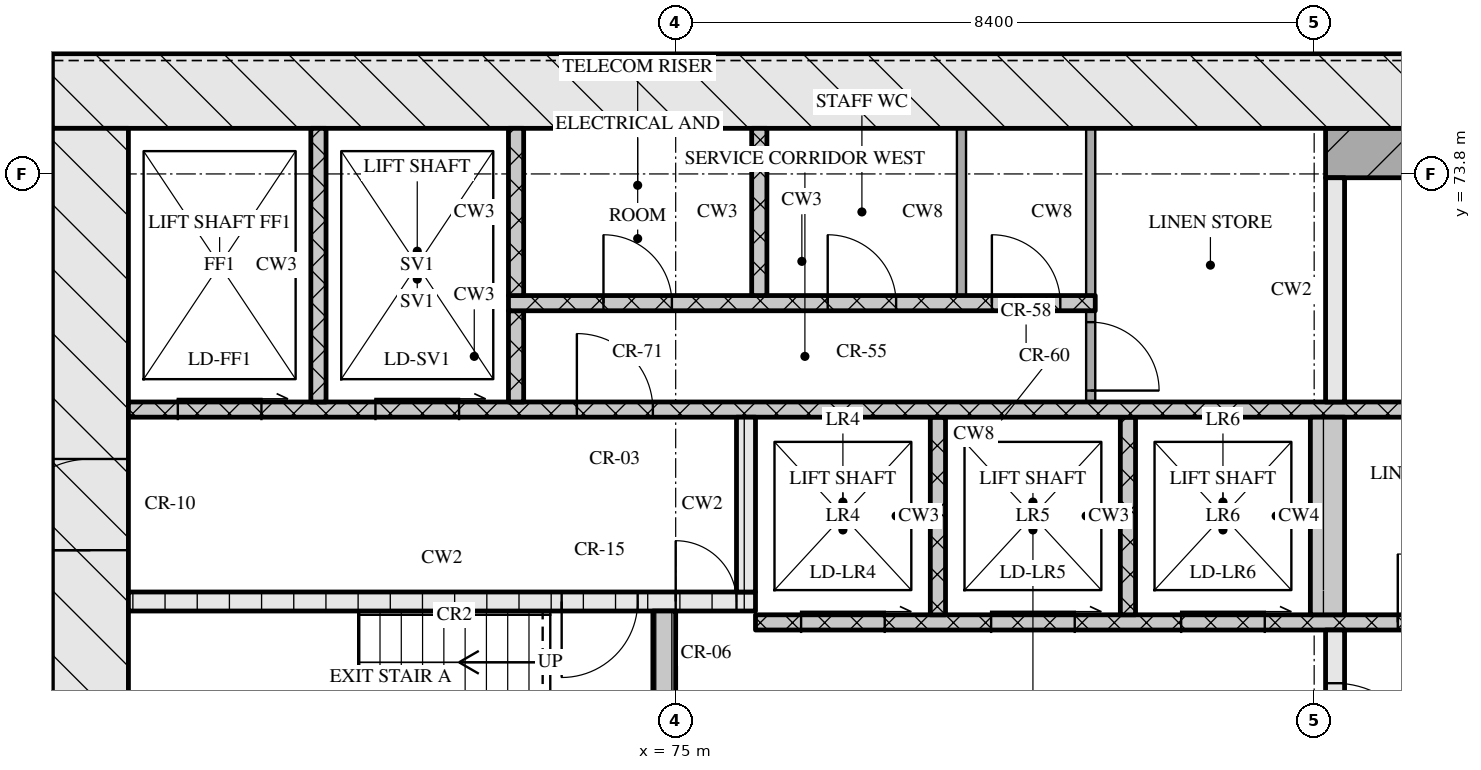
"""IFC4 building model, lengths in metres.
Left out: names, types, materials, properties, quantities, classifications, styles, units other than length and angle.
Written with IfcOpenShell. Run it as: python <this file> out.ifc"""

import sys

from ifc_helpers import new_model, si_unit, direction, frame, frame_2d, origin, place, context, subcontext, project, spatial, rectangle, extrude, element, fill, save


model = new_model("IFC4")
c1 = context("Model", 3, precision=1e-05, world=origin(), true_north=direction((0.0, 1.0)))
c2 = subcontext(c1, "Body", "Model", "MODEL_VIEW")
j1 = project(units=[si_unit("LENGTHUNIT", "METRE"), si_unit("PLANEANGLEUNIT", "RADIAN")], contexts=[c1])
p1 = place(None, origin())
s1 = spatial("IfcSite", under=j1, at=p1, CompositionType="ELEMENT")
p2 = place(p1, origin())
s2 = spatial("IfcBuilding", under=s1, at=p2, CompositionType="ELEMENT")
p3 = place(p2, frame((0.0, 0.0, 120.45)))
s3 = spatial("IfcBuildingStorey", under=s2, at=p3, CompositionType="ELEMENT", Elevation=120.45)
p4 = place(p3, frame((66.8, 74.9, 0.0), z_axis=(0.0, 0.0, 1.0), x_axis=(1.0, 0.0, 0.0)))
e1 = element("IfcWall", 1, at=p4, inside=s3, PredefinedType="SOLIDWALL", context=c2, shape_type="SweptSolid", body=[
    extrude(rectangle(XDim=41.6, YDim=1.0, at=frame_2d((20.8, 0.0))), origin(), (0.0, 0.0, 1.0), 3.32),
])
p5 = place(p3, frame((67.3, 62.4, 0.0), z_axis=(0.0, 0.0, 1.0), x_axis=(0.0, 1.0, 0.0)))
e2 = element("IfcWall", 2, at=p5, inside=s3, PredefinedType="SOLIDWALL", context=c2, shape_type="SweptSolid", body=[
    extrude(rectangle(XDim=12.0, YDim=1.0, at=frame_2d((6.0, 0.0))), origin(), (0.0, 0.0, 1.0), 3.32),
])
p6 = place(p5, frame((6.45, 0.0, 0.0)))
e3 = element("IfcOpeningElement", 3, at=p6, cuts=e2, PredefinedType="OPENING", context=c2, shape_type="SweptSolid", body=[
    extrude(rectangle(XDim=1.2, YDim=2.1, at=frame_2d((0.6, 1.05))), frame((0.0, 0.51, 0.0), z_axis=(0.0, -1.0, 0.0), x_axis=(1.0, 0.0, 0.0)), (0.0, 0.0, 1.0), 1.02),
])
p7 = place(p3, frame((74.85, 65.2, 0.0), z_axis=(0.0, 0.0, 1.0), x_axis=(0.0, 1.0, 0.0)))
e4 = element("IfcWall", 4, at=p7, inside=s3, PredefinedType="SOLIDWALL", context=c2, shape_type="SweptSolid", body=[
    extrude(rectangle(XDim=2.85, YDim=0.3, at=frame_2d((1.425, 0.0))), origin(), (0.0, 0.0, 1.0), 3.32),
])
p8 = place(p3, frame((83.675, 65.2, 0.0), z_axis=(0.0, 0.0, 1.0), x_axis=(0.0, 1.0, 0.0)))
e5 = element("IfcWall", 5, at=p8, inside=s3, PredefinedType="SOLIDWALL", context=c2, shape_type="SweptSolid", body=[
    extrude(rectangle(XDim=2.6, YDim=0.25, at=frame_2d((1.3, 0.0))), origin(), (0.0, 0.0, 1.0), 3.32),
])
p9 = place(p8, frame((0.7, 0.0, 0.0)))
e6 = element("IfcOpeningElement", 6, at=p9, cuts=e5, PredefinedType="OPENING", context=c2, shape_type="SweptSolid", body=[
    extrude(rectangle(XDim=1.2, YDim=2.1, at=frame_2d((0.6, 1.05))), frame((0.0, 0.135, 0.0), z_axis=(0.0, -1.0, 0.0), x_axis=(1.0, 0.0, 0.0)), (0.0, 0.0, 1.0), 0.27),
])
p10 = place(p3, frame((76.05, 67.9, 0.0), z_axis=(0.0, 0.0, 1.0), x_axis=(1.0, 0.0, 0.0)))
e7 = element("IfcWall", 7, at=p10, inside=s3, PredefinedType="SOLIDWALL", context=c2, shape_type="SweptSolid", body=[
    extrude(rectangle(XDim=23.1, YDim=0.2, at=frame_2d((11.55, 0.0))), origin(), (0.0, 0.0, 1.0), 3.32),
])
p11 = place(p10, frame((0.6, 0.0, 0.0)))
e8 = element("IfcOpeningElement", 8, at=p11, cuts=e7, PredefinedType="OPENING", context=c2, shape_type="SweptSolid", body=[
    extrude(rectangle(XDim=1.1, YDim=2.1, at=frame_2d((0.55, 1.05))), frame((0.0, 0.11, 0.0), z_axis=(0.0, -1.0, 0.0), x_axis=(1.0, 0.0, 0.0)), (0.0, 0.0, 1.0), 0.22),
])
p12 = place(p10, frame((3.1, 0.0, 0.0)))
e9 = element("IfcOpeningElement", 9, at=p12, cuts=e7, PredefinedType="OPENING", context=c2, shape_type="SweptSolid", body=[
    extrude(rectangle(XDim=1.1, YDim=2.1, at=frame_2d((0.55, 1.05))), frame((0.0, 0.11, 0.0), z_axis=(0.0, -1.0, 0.0), x_axis=(1.0, 0.0, 0.0)), (0.0, 0.0, 1.0), 0.22),
])
p13 = place(p10, frame((5.6, 0.0, 0.0)))
e10 = element("IfcOpeningElement", 10, at=p13, cuts=e7, PredefinedType="OPENING", context=c2, shape_type="SweptSolid", body=[
    extrude(rectangle(XDim=1.1, YDim=2.1, at=frame_2d((0.55, 1.05))), frame((0.0, 0.11, 0.0), z_axis=(0.0, -1.0, 0.0), x_axis=(1.0, 0.0, 0.0)), (0.0, 0.0, 1.0), 0.22),
])
p14 = place(p10, frame((8.45, 0.0, 0.0)))
e11 = element("IfcOpeningElement", 11, at=p14, cuts=e7, PredefinedType="OPENING", context=c2, shape_type="SweptSolid", body=[
    extrude(rectangle(XDim=0.9, YDim=2.1, at=frame_2d((0.45, 1.05))), frame((0.0, 0.11, 0.0), z_axis=(0.0, -1.0, 0.0), x_axis=(1.0, 0.0, 0.0)), (0.0, 0.0, 1.0), 0.22),
])
p15 = place(p10, frame((10.91, 0.0, 0.0)))
e12 = element("IfcOpeningElement", 12, at=p15, cuts=e7, PredefinedType="OPENING", context=c2, shape_type="SweptSolid", body=[
    extrude(rectangle(XDim=0.9, YDim=2.1, at=frame_2d((0.45, 1.05))), frame((0.0, 0.11, 0.0), z_axis=(0.0, -1.0, 0.0), x_axis=(1.0, 0.0, 0.0)), (0.0, 0.0, 1.0), 0.22),
])
p16 = place(p10, frame((13.55, 0.0, 0.0)))
e13 = element("IfcOpeningElement", 13, at=p16, cuts=e7, PredefinedType="OPENING", context=c2, shape_type="SweptSolid", body=[
    extrude(rectangle(XDim=1.0, YDim=2.1, at=frame_2d((0.5, 1.05))), frame((0.0, 0.11, 0.0), z_axis=(0.0, -1.0, 0.0), x_axis=(1.0, 0.0, 0.0)), (0.0, 0.0, 1.0), 0.22),
])
for number, where, z_axis, x_axis in (
    (14, (78.45, 68.0, 0.0), (0.0, 0.0, 1.0), (0.0, 1.0, 0.0)),
    (15, (80.95, 68.0, 0.0), (0.0, 0.0, 1.0), (0.0, 1.0, 0.0)),
):
    element("IfcWall", number, at=place(p3, frame(where, z_axis=z_axis, x_axis=x_axis)), inside=s3, PredefinedType="SOLIDWALL", context=c2, shape_type="SweptSolid", body=[
        extrude(rectangle(XDim=2.6, YDim=0.2, at=frame_2d((1.3, 0.0))), origin(), (0.0, 0.0, 1.0), 3.32),
    ])
p17 = place(p3, frame((83.575, 68.0, 0.0), z_axis=(0.0, 0.0, 1.0), x_axis=(0.0, 1.0, 0.0)))
e16 = element("IfcWall", 16, at=p17, inside=s3, PredefinedType="SOLIDWALL", context=c2, shape_type="SweptSolid", body=[
    extrude(rectangle(XDim=2.6, YDim=0.45, at=frame_2d((1.3, 0.0))), origin(), (0.0, 0.0, 1.0), 3.32),
])
p18 = place(p3, frame((67.8, 68.175, 0.0), z_axis=(0.0, 0.0, 1.0), x_axis=(1.0, 0.0, 0.0)))
e17 = element("IfcWall", 17, at=p18, inside=s3, PredefinedType="SOLIDWALL", context=c2, shape_type="SweptSolid", body=[
    extrude(rectangle(XDim=8.25, YDim=0.25, at=frame_2d((4.125, 0.0))), origin(), (0.0, 0.0, 1.0), 3.32),
])
p19 = place(p18, frame((5.7, 0.0, 0.0)))
e18 = element("IfcOpeningElement", 18, at=p19, cuts=e17, PredefinedType="OPENING", context=c2, shape_type="SweptSolid", body=[
    extrude(rectangle(XDim=1.0, YDim=2.1, at=frame_2d((0.5, 1.05))), frame((0.0, 0.135, 0.0), z_axis=(0.0, -1.0, 0.0), x_axis=(1.0, 0.0, 0.0)), (0.0, 0.0, 1.0), 0.27),
])
p20 = place(p18, frame((7.2, 0.0, 0.0)))
e19 = element("IfcOpeningElement", 19, at=p20, cuts=e17, PredefinedType="OPENING", context=c2, shape_type="SweptSolid", body=[
    extrude(rectangle(XDim=0.8, YDim=2.1, at=frame_2d((0.4, 1.05))), frame((0.0, 0.135, 0.0), z_axis=(0.0, -1.0, 0.0), x_axis=(1.0, 0.0, 0.0)), (0.0, 0.0, 1.0), 0.27),
])
p21 = place(p3, frame((75.925, 68.3, 0.0), z_axis=(0.0, 0.0, 1.0), x_axis=(0.0, 1.0, 0.0)))
e20 = element("IfcWall", 20, at=p21, inside=s3, PredefinedType="SOLIDWALL", context=c2, shape_type="SweptSolid", body=[
    extrude(rectangle(XDim=2.3, YDim=0.25, at=frame_2d((1.15, 0.0))), origin(), (0.0, 0.0, 1.0), 3.32),
])
p22 = place(p3, frame((67.8, 70.7, 0.0), z_axis=(0.0, 0.0, 1.0), x_axis=(1.0, 0.0, 0.0)))
e21 = element("IfcWall", 21, at=p22, inside=s3, PredefinedType="SOLIDWALL", context=c2, shape_type="SweptSolid", body=[
    extrude(rectangle(XDim=39.6, YDim=0.2, at=frame_2d((19.8, 0.0))), origin(), (0.0, 0.0, 1.0), 3.32),
])
p23 = place(p22, frame((0.65, 0.0, 0.0)))
e22 = element("IfcOpeningElement", 22, at=p23, cuts=e21, PredefinedType="OPENING", context=c2, shape_type="SweptSolid", body=[
    extrude(rectangle(XDim=1.1, YDim=2.1, at=frame_2d((0.55, 1.05))), frame((0.0, 0.11, 0.0), z_axis=(0.0, -1.0, 0.0), x_axis=(1.0, 0.0, 0.0)), (0.0, 0.0, 1.0), 0.22),
])
p24 = place(p22, frame((3.25, 0.0, 0.0)))
e23 = element("IfcOpeningElement", 23, at=p24, cuts=e21, PredefinedType="OPENING", context=c2, shape_type="SweptSolid", body=[
    extrude(rectangle(XDim=1.1, YDim=2.1, at=frame_2d((0.55, 1.05))), frame((0.0, 0.11, 0.0), z_axis=(0.0, -1.0, 0.0), x_axis=(1.0, 0.0, 0.0)), (0.0, 0.0, 1.0), 0.22),
])
p25 = place(p22, frame((5.9, 0.0, 0.0)))
e24 = element("IfcOpeningElement", 24, at=p25, cuts=e21, PredefinedType="OPENING", context=c2, shape_type="SweptSolid", body=[
    extrude(rectangle(XDim=1.0, YDim=2.1, at=frame_2d((0.5, 1.05))), frame((0.0, 0.11, 0.0), z_axis=(0.0, -1.0, 0.0), x_axis=(1.0, 0.0, 0.0)), (0.0, 0.0, 1.0), 0.22),
])
p26 = place(p22, frame((21.7, 0.0, 0.0)))
e25 = element("IfcOpeningElement", 25, at=p26, cuts=e21, PredefinedType="OPENING", context=c2, shape_type="SweptSolid", body=[
    extrude(rectangle(XDim=1.0, YDim=2.1, at=frame_2d((0.5, 1.05))), frame((0.0, 0.11, 0.0), z_axis=(0.0, -1.0, 0.0), x_axis=(1.0, 0.0, 0.0)), (0.0, 0.0, 1.0), 0.22),
])
p27 = place(p22, frame((32.7, 0.0, 0.0)))
e26 = element("IfcOpeningElement", 26, at=p27, cuts=e21, PredefinedType="OPENING", context=c2, shape_type="SweptSolid", body=[
    extrude(rectangle(XDim=1.0, YDim=2.1, at=frame_2d((0.5, 1.05))), frame((0.0, 0.11, 0.0), z_axis=(0.0, -1.0, 0.0), x_axis=(1.0, 0.0, 0.0)), (0.0, 0.0, 1.0), 0.22),
])
p28 = place(p22, frame((35.25, 0.0, 0.0)))
e27 = element("IfcOpeningElement", 27, at=p28, cuts=e21, PredefinedType="OPENING", context=c2, shape_type="SweptSolid", body=[
    extrude(rectangle(XDim=1.1, YDim=2.1, at=frame_2d((0.55, 1.05))), frame((0.0, 0.11, 0.0), z_axis=(0.0, -1.0, 0.0), x_axis=(1.0, 0.0, 0.0)), (0.0, 0.0, 1.0), 0.22),
])
p29 = place(p22, frame((37.85, 0.0, 0.0)))
e28 = element("IfcOpeningElement", 28, at=p29, cuts=e21, PredefinedType="OPENING", context=c2, shape_type="SweptSolid", body=[
    extrude(rectangle(XDim=1.1, YDim=2.1, at=frame_2d((0.55, 1.05))), frame((0.0, 0.11, 0.0), z_axis=(0.0, -1.0, 0.0), x_axis=(1.0, 0.0, 0.0)), (0.0, 0.0, 1.0), 0.22),
])
p30 = place(p3, frame((70.3, 70.8, 0.0), z_axis=(0.0, 0.0, 1.0), x_axis=(0.0, 1.0, 0.0)))
e29 = element("IfcWall", 29, at=p30, inside=s3, PredefinedType="SOLIDWALL", context=c2, shape_type="SweptSolid", body=[
    extrude(rectangle(XDim=3.6, YDim=0.2, at=frame_2d((1.8, 0.0))), origin(), (0.0, 0.0, 1.0), 3.32),
])
p31 = place(p3, frame((72.9, 70.8, 0.0), z_axis=(0.0, 0.0, 1.0), x_axis=(0.0, 1.0, 0.0)))
e30 = element("IfcWall", 30, at=p31, inside=s3, PredefinedType="SOLIDWALL", context=c2, shape_type="SweptSolid", body=[
    extrude(rectangle(XDim=1.2, YDim=0.2, at=frame_2d((0.6, 0.0))), origin(), (0.0, 0.0, 1.0), 3.32),
])
p32 = place(p3, frame((80.46, 70.8, 0.0), z_axis=(0.0, 0.0, 1.0), x_axis=(0.0, 1.0, 0.0)))
e31 = element("IfcWall", 31, at=p32, inside=s3, PredefinedType="PARTITIONING", context=c2, shape_type="SweptSolid", body=[
    extrude(rectangle(XDim=1.2, YDim=0.12, at=frame_2d((0.6, 0.0))), origin(), (0.0, 0.0, 1.0), 3.32),
])
p33 = place(p32, frame((0.15, 0.0, 0.0)))
e32 = element("IfcOpeningElement", 32, at=p33, cuts=e31, PredefinedType="OPENING", context=c2, shape_type="SweptSolid", body=[
    extrude(rectangle(XDim=0.9, YDim=2.1, at=frame_2d((0.45, 1.05))), frame((0.0, 0.07, 0.0), z_axis=(0.0, -1.0, 0.0), x_axis=(1.0, 0.0, 0.0)), (0.0, 0.0, 1.0), 0.14),
])
p34 = place(p3, frame((83.675, 70.8, 0.0), z_axis=(0.0, 0.0, 1.0), x_axis=(0.0, 1.0, 0.0)))
e33 = element("IfcWall", 33, at=p34, inside=s3, PredefinedType="SOLIDWALL", context=c2, shape_type="SweptSolid", body=[
    extrude(rectangle(XDim=2.95, YDim=0.25, at=frame_2d((1.475, 0.0))), origin(), (0.0, 0.0, 1.0), 3.32),
])
p35 = place(p3, frame((72.8, 72.1, 0.0), z_axis=(0.0, 0.0, 1.0), x_axis=(1.0, 0.0, 0.0)))
e34 = element("IfcWall", 34, at=p35, inside=s3, PredefinedType="SOLIDWALL", context=c2, shape_type="SweptSolid", body=[
    extrude(rectangle(XDim=7.72, YDim=0.2, at=frame_2d((3.86, 0.0))), origin(), (0.0, 0.0, 1.0), 3.32),
])
p36 = place(p35, frame((1.25, 0.0, 0.0)))
e35 = element("IfcOpeningElement", 35, at=p36, cuts=e34, PredefinedType="OPENING", context=c2, shape_type="SweptSolid", body=[
    extrude(rectangle(XDim=0.9, YDim=2.1, at=frame_2d((0.45, 1.05))), frame((0.0, 0.11, 0.0), z_axis=(0.0, -1.0, 0.0), x_axis=(1.0, 0.0, 0.0)), (0.0, 0.0, 1.0), 0.22),
])
p37 = place(p35, frame((4.2, 0.0, 0.0)))
e36 = element("IfcOpeningElement", 36, at=p37, cuts=e34, PredefinedType="OPENING", context=c2, shape_type="SweptSolid", body=[
    extrude(rectangle(XDim=0.9, YDim=2.1, at=frame_2d((0.45, 1.05))), frame((0.0, 0.11, 0.0), z_axis=(0.0, -1.0, 0.0), x_axis=(1.0, 0.0, 0.0)), (0.0, 0.0, 1.0), 0.22),
])
p38 = place(p35, frame((6.36, 0.0, 0.0)))
e37 = element("IfcOpeningElement", 37, at=p38, cuts=e34, PredefinedType="OPENING", context=c2, shape_type="SweptSolid", body=[
    extrude(rectangle(XDim=0.9, YDim=2.1, at=frame_2d((0.45, 1.05))), frame((0.0, 0.11, 0.0), z_axis=(0.0, -1.0, 0.0), x_axis=(1.0, 0.0, 0.0)), (0.0, 0.0, 1.0), 0.22),
])
for number, where, z_axis, x_axis in (
    (38, (72.9, 72.2, 0.0), (0.0, 0.0, 1.0), (0.0, 1.0, 0.0)),
    (39, (76.1, 72.2, 0.0), (0.0, 0.0, 1.0), (0.0, 1.0, 0.0)),
):
    element("IfcWall", number, at=place(p3, frame(where, z_axis=z_axis, x_axis=x_axis)), inside=s3, PredefinedType="SOLIDWALL", context=c2, shape_type="SweptSolid", body=[
        extrude(rectangle(XDim=2.2, YDim=0.2, at=frame_2d((1.1, 0.0))), origin(), (0.0, 0.0, 1.0), 3.32),
    ])
for number, where, z_axis, x_axis in (
    (40, (78.76, 72.2, 0.0), (0.0, 0.0, 1.0), (0.0, 1.0, 0.0)),
    (41, (80.46, 72.2, 0.0), (0.0, 0.0, 1.0), (0.0, 1.0, 0.0)),
):
    element("IfcWall", number, at=place(p3, frame(where, z_axis=z_axis, x_axis=x_axis)), inside=s3, PredefinedType="PARTITIONING", context=c2, shape_type="SweptSolid", body=[
        extrude(rectangle(XDim=2.2, YDim=0.12, at=frame_2d((1.1, 0.0))), origin(), (0.0, 0.0, 1.0), 3.32),
    ])
p39 = place(p3, frame((83.55, 74.075, 0.0), z_axis=(0.0, 0.0, 1.0), x_axis=(1.0, 0.0, 0.0)))
e42 = element("IfcWall", 42, at=p39, inside=s3, PredefinedType="SOLIDWALL", context=c2, shape_type="SweptSolid", body=[
    extrude(rectangle(XDim=8.1, YDim=0.65, at=frame_2d((4.05, 0.0))), origin(), (0.0, 0.0, 1.0), 3.32),
])
p40 = place(p9, origin())
e43 = element("IfcDoor", 43, at=p40, inside=s3, OperationType="SINGLE_SWING_RIGHT", PredefinedType="DOOR", context=c2, shape_type="SweptSolid", body=[
    extrude(rectangle(XDim=1.2, YDim=2.1, at=frame_2d((0.6, 1.05))), frame((0.0, 0.025, 0.0), z_axis=(0.0, -1.0, 0.0), x_axis=(1.0, 0.0, 0.0)), (0.0, 0.0, 1.0), 0.05),
])
fill(e6, e43)
p41 = place(p11, origin())
e44 = element("IfcDoor", 44, at=p41, inside=s3, OperationType="SLIDING_TO_RIGHT", PredefinedType="DOOR", context=c2, shape_type="SweptSolid", body=[
    extrude(rectangle(XDim=1.1, YDim=2.1, at=frame_2d((0.55, 1.05))), frame((0.0, 0.025, 0.0), z_axis=(0.0, -1.0, 0.0), x_axis=(1.0, 0.0, 0.0)), (0.0, 0.0, 1.0), 0.05),
])
fill(e8, e44)
p42 = place(p12, origin())
e45 = element("IfcDoor", 45, at=p42, inside=s3, OperationType="SLIDING_TO_RIGHT", PredefinedType="DOOR", context=c2, shape_type="SweptSolid", body=[
    extrude(rectangle(XDim=1.1, YDim=2.1, at=frame_2d((0.55, 1.05))), frame((0.0, 0.025, 0.0), z_axis=(0.0, -1.0, 0.0), x_axis=(1.0, 0.0, 0.0)), (0.0, 0.0, 1.0), 0.05),
])
fill(e9, e45)
p43 = place(p13, origin())
e46 = element("IfcDoor", 46, at=p43, inside=s3, OperationType="SLIDING_TO_RIGHT", PredefinedType="DOOR", context=c2, shape_type="SweptSolid", body=[
    extrude(rectangle(XDim=1.1, YDim=2.1, at=frame_2d((0.55, 1.05))), frame((0.0, 0.025, 0.0), z_axis=(0.0, -1.0, 0.0), x_axis=(1.0, 0.0, 0.0)), (0.0, 0.0, 1.0), 0.05),
])
fill(e10, e46)
p44 = place(p14, origin())
e47 = element("IfcDoor", 47, at=p44, inside=s3, OperationType="SINGLE_SWING_LEFT", PredefinedType="DOOR", context=c2, shape_type="SweptSolid", body=[
    extrude(rectangle(XDim=0.9, YDim=2.1, at=frame_2d((0.45, 1.05))), frame((0.0, 0.025, 0.0), z_axis=(0.0, -1.0, 0.0), x_axis=(1.0, 0.0, 0.0)), (0.0, 0.0, 1.0), 0.05),
])
fill(e11, e47)
p45 = place(p19, origin())
e48 = element("IfcDoor", 48, at=p45, inside=s3, OperationType="SINGLE_SWING_RIGHT", PredefinedType="DOOR", context=c2, shape_type="SweptSolid", body=[
    extrude(rectangle(XDim=1.0, YDim=2.1, at=frame_2d((0.5, 1.05))), frame((0.0, 0.025, 0.0), z_axis=(0.0, -1.0, 0.0), x_axis=(1.0, 0.0, 0.0)), (0.0, 0.0, 1.0), 0.05),
])
fill(e18, e48)
p46 = place(p20, origin())
e49 = element("IfcDoor", 49, at=p46, inside=s3, OperationType="SINGLE_SWING_LEFT", PredefinedType="DOOR", context=c2, shape_type="SweptSolid", body=[
    extrude(rectangle(XDim=0.8, YDim=2.1, at=frame_2d((0.4, 1.05))), frame((0.0, 0.025, 0.0), z_axis=(0.0, -1.0, 0.0), x_axis=(1.0, 0.0, 0.0)), (0.0, 0.0, 1.0), 0.05),
])
fill(e19, e49)
p47 = place(p6, origin())
e50 = element("IfcDoor", 50, at=p47, inside=s3, OperationType="SINGLE_SWING_LEFT", PredefinedType="DOOR", context=c2, shape_type="SweptSolid", body=[
    extrude(rectangle(XDim=1.2, YDim=2.1, at=frame_2d((0.6, 1.05))), frame((0.0, 0.025, 0.0), z_axis=(0.0, -1.0, 0.0), x_axis=(1.0, 0.0, 0.0)), (0.0, 0.0, 1.0), 0.05),
])
fill(e3, e50)
p48 = place(p23, origin())
e51 = element("IfcDoor", 51, at=p48, inside=s3, OperationType="SLIDING_TO_RIGHT", PredefinedType="DOOR", context=c2, shape_type="SweptSolid", body=[
    extrude(rectangle(XDim=1.1, YDim=2.1, at=frame_2d((0.55, 1.05))), frame((0.0, 0.025, 0.0), z_axis=(0.0, -1.0, 0.0), x_axis=(1.0, 0.0, 0.0)), (0.0, 0.0, 1.0), 0.05),
])
fill(e22, e51)
p49 = place(p24, origin())
e52 = element("IfcDoor", 52, at=p49, inside=s3, OperationType="SLIDING_TO_RIGHT", PredefinedType="DOOR", context=c2, shape_type="SweptSolid", body=[
    extrude(rectangle(XDim=1.1, YDim=2.1, at=frame_2d((0.55, 1.05))), frame((0.0, 0.025, 0.0), z_axis=(0.0, -1.0, 0.0), x_axis=(1.0, 0.0, 0.0)), (0.0, 0.0, 1.0), 0.05),
])
fill(e23, e52)
p50 = place(p25, origin())
e53 = element("IfcDoor", 53, at=p50, inside=s3, OperationType="SINGLE_SWING_LEFT", PredefinedType="DOOR", context=c2, shape_type="SweptSolid", body=[
    extrude(rectangle(XDim=1.0, YDim=2.1, at=frame_2d((0.5, 1.05))), frame((0.0, 0.025, 0.0), z_axis=(0.0, -1.0, 0.0), x_axis=(1.0, 0.0, 0.0)), (0.0, 0.0, 1.0), 0.05),
])
fill(e24, e53)
p51 = place(p33, origin())
e54 = element("IfcDoor", 54, at=p51, inside=s3, OperationType="SINGLE_SWING_RIGHT", PredefinedType="DOOR", context=c2, shape_type="SweptSolid", body=[
    extrude(rectangle(XDim=0.9, YDim=2.1, at=frame_2d((0.45, 1.05))), frame((0.0, 0.025, 0.0), z_axis=(0.0, -1.0, 0.0), x_axis=(1.0, 0.0, 0.0)), (0.0, 0.0, 1.0), 0.05),
])
fill(e32, e54)
p52 = place(p36, origin())
e55 = element("IfcDoor", 55, at=p52, inside=s3, OperationType="SINGLE_SWING_LEFT", PredefinedType="DOOR", context=c2, shape_type="SweptSolid", body=[
    extrude(rectangle(XDim=0.9, YDim=2.1, at=frame_2d((0.45, 1.05))), frame((0.0, 0.025, 0.0), z_axis=(0.0, -1.0, 0.0), x_axis=(1.0, 0.0, 0.0)), (0.0, 0.0, 1.0), 0.05),
])
fill(e35, e55)
p53 = place(p37, origin())
e56 = element("IfcDoor", 56, at=p53, inside=s3, OperationType="SINGLE_SWING_LEFT", PredefinedType="DOOR", context=c2, shape_type="SweptSolid", body=[
    extrude(rectangle(XDim=0.9, YDim=2.1, at=frame_2d((0.45, 1.05))), frame((0.0, 0.025, 0.0), z_axis=(0.0, -1.0, 0.0), x_axis=(1.0, 0.0, 0.0)), (0.0, 0.0, 1.0), 0.05),
])
fill(e36, e56)
p54 = place(p38, origin())
e57 = element("IfcDoor", 57, at=p54, inside=s3, OperationType="SINGLE_SWING_LEFT", PredefinedType="DOOR", context=c2, shape_type="SweptSolid", body=[
    extrude(rectangle(XDim=0.9, YDim=2.1, at=frame_2d((0.45, 1.05))), frame((0.0, 0.025, 0.0), z_axis=(0.0, -1.0, 0.0), x_axis=(1.0, 0.0, 0.0)), (0.0, 0.0, 1.0), 0.05),
])
fill(e37, e57)
save(model, sys.argv[1])
